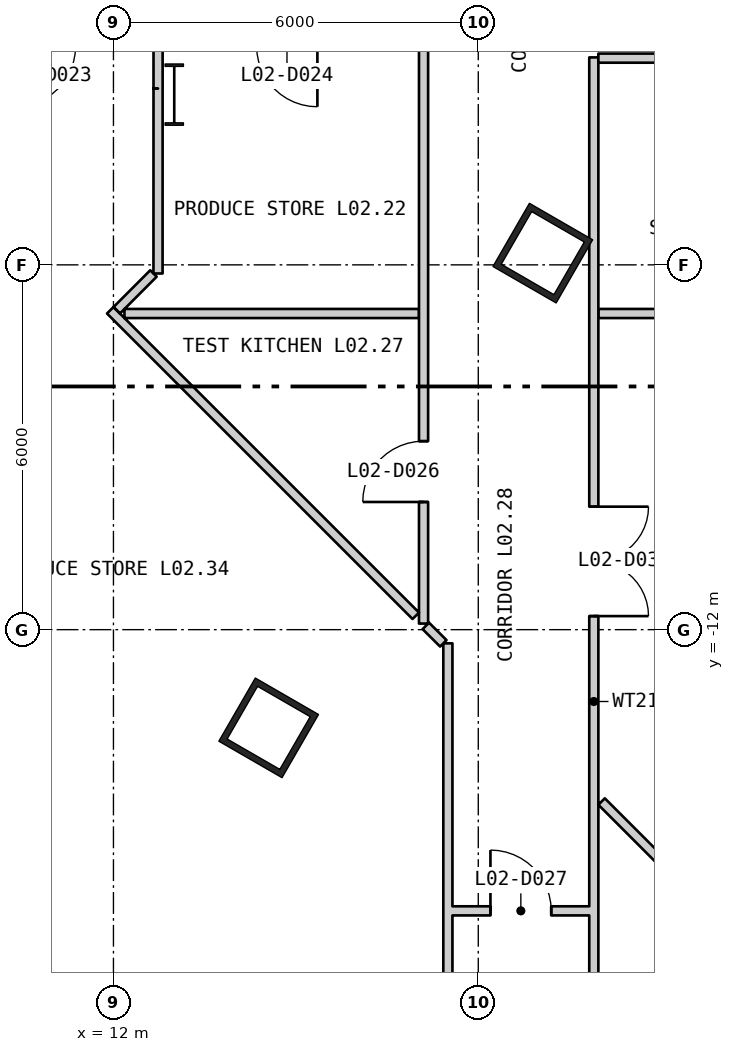
"""IFC4 building model, lengths in metres.
Left out: names, types, materials, properties, quantities, classifications, styles, units other than length and angle.
Written with IfcOpenShell. Run it as: python <this file> out.ifc"""

import sys

from ifc_helpers import new_model, si_unit, direction, frame, frame_2d, origin, origin_2d, place, context, subcontext, project, spatial, rectangle, hollow_rectangle, i_section, extrude, element, fill, save


model = new_model("IFC4")
c1 = context("Model", 3, precision=1e-05, world=origin(), true_north=direction((0.0, 1.0)))
c2 = subcontext(c1, "Body", "Model", "MODEL_VIEW")
j1 = project(units=[si_unit("LENGTHUNIT", "METRE"), si_unit("PLANEANGLEUNIT", "RADIAN")], contexts=[c1])
p1 = place(None, origin())
s1 = spatial("IfcSite", under=j1, at=p1, CompositionType="ELEMENT")
p2 = place(p1, origin())
s2 = spatial("IfcBuilding", under=s1, at=p2, CompositionType="ELEMENT")
p3 = place(p2, frame((0.0, 0.0, 13.5)))
s3 = spatial("IfcBuildingStorey", under=s2, at=p3, CompositionType="ELEMENT", Elevation=13.5)
for number, where, z_axis, x_axis in (
    (1, (14.553, -13.615, 0.0), (0.0, 0.0, 1.0), (0.5, 0.866, 0.0)),
    (2, (19.061, -5.807, 0.0), (0.0, 0.0, 1.0), (0.5, 0.866, 0.0)),
):
    element("IfcColumn", number, at=place(p3, frame(where, z_axis=z_axis, x_axis=x_axis)), inside=s3, PredefinedType="COLUMN", context=c2, shape_type="SweptSolid", body=[
        extrude(hollow_rectangle(XDim=1.2, YDim=1.2, WallThickness=0.1, at=origin_2d()), origin(), (0.0, 0.0, 1.0), 5.1),
    ])
p4 = place(p3, frame((13.0, -3.2, 0.0), z_axis=(0.0, 0.0, 1.0), x_axis=(1.0, 0.0, 0.0)))
e3 = element("IfcColumn", 3, at=p4, inside=s3, PredefinedType="COLUMN", context=c2, shape_type="SweptSolid", body=[
    extrude(i_section(OverallWidth=0.302, OverallDepth=1.008, WebThickness=0.021, FlangeThickness=0.04, at=origin_2d()), origin(), (0.0, 0.0, 1.0), 5.1),
])
p5 = place(p3, frame((11.947, -6.747, 0.0), z_axis=(0.0, 0.0, 1.0), x_axis=(0.707106781187, -0.707106781187, 0.0)))
e4 = element("IfcWall", 4, at=p5, inside=s3, PredefinedType="PARTITIONING", context=c2, shape_type="SweptSolid", body=[
    extrude(rectangle(XDim=7.106, YDim=0.15, at=frame_2d((3.553, 0.0))), origin(), (0.0, 0.0, 1.0), 4.88),
])
p6 = place(p3, frame((12.054, -6.747, 0.0), z_axis=(0.0, 0.0, 1.0), x_axis=(0.706521670373, 0.707691408238, 0.0)))
e5 = element("IfcWall", 5, at=p6, inside=s3, PredefinedType="PARTITIONING", context=c2, shape_type="SweptSolid", body=[
    extrude(rectangle(XDim=0.855, YDim=0.15, at=frame_2d((0.427, 0.0))), origin(), (0.0, 0.0, 1.0), 4.88),
])
p7 = place(p3, frame((12.181, -6.8, 0.0), z_axis=(0.0, 0.0, 1.0), x_axis=(1.0, 0.0, 0.0)))
e6 = element("IfcWall", 6, at=p7, inside=s3, PredefinedType="PARTITIONING", context=c2, shape_type="SweptSolid", body=[
    extrude(rectangle(XDim=4.844, YDim=0.15, at=frame_2d((2.422, 0.0))), origin(), (0.0, 0.0, 1.0), 4.88),
])
p8 = place(p3, frame((12.733, -6.142, 0.0), z_axis=(0.0, 0.0, 1.0), x_axis=(0.000262984869, 0.999999965419, 0.0)))
e7 = element("IfcWall", 7, at=p8, inside=s3, PredefinedType="PARTITIONING", context=c2, shape_type="SweptSolid", body=[
    extrude(rectangle(XDim=3.042, YDim=0.15, at=frame_2d((1.521, 0.0))), origin(), (0.0, 0.0, 1.0), 4.19),
])
p9 = place(p3, frame((12.734, -3.1, 0.0), z_axis=(0.0, 0.0, 1.0), x_axis=(0.000319999984, 0.9999999488, 0.0)))
e8 = element("IfcWall", 8, at=p9, inside=s3, PredefinedType="PARTITIONING", context=c2, shape_type="SweptSolid", body=[
    extrude(rectangle(XDim=0.625, YDim=0.15, at=frame_2d((0.312, 0.0))), origin(), (0.0, 0.0, 1.0), 4.28),
])
p10 = place(p3, frame((17.1, -11.9, 0.0), z_axis=(0.0, 0.0, 1.0), x_axis=(0.0, 1.0, 0.0)))
e9 = element("IfcWall", 9, at=p10, inside=s3, PredefinedType="PARTITIONING", context=c2, shape_type="SweptSolid", body=[
    extrude(rectangle(XDim=9.575, YDim=0.15, at=frame_2d((4.787, 0.0))), origin(), (0.0, 0.0, 1.0), 4.88),
])
p11 = place(p10, frame((2.0, 0.0, 0.0)))
e10 = element("IfcOpeningElement", 10, at=p11, cuts=e9, PredefinedType="OPENING", context=c2, shape_type="SweptSolid", body=[
    extrude(rectangle(XDim=1.0, YDim=2.1, at=frame_2d((0.5, 1.05))), frame((0.0, 0.085, 0.0), z_axis=(0.0, -1.0, 0.0), x_axis=(1.0, 0.0, 0.0)), (0.0, 0.0, 1.0), 0.17),
])
p12 = place(p3, frame((17.137, -11.938, 0.0), z_axis=(0.0, 0.0, 1.0), x_axis=(0.708335460904, -0.705875962776, 0.0)))
e11 = element("IfcWall", 11, at=p12, inside=s3, PredefinedType="PARTITIONING", context=c2, shape_type="SweptSolid", body=[
    extrude(rectangle(XDim=0.407, YDim=0.15, at=frame_2d((0.203, 0.0))), origin(), (0.0, 0.0, 1.0), 4.88),
])
p13 = place(p3, frame((17.5, -20.513, 0.0), z_axis=(0.0, 0.0, 1.0), x_axis=(0.0, 1.0, 0.0)))
e12 = element("IfcWall", 12, at=p13, inside=s3, PredefinedType="PARTITIONING", context=c2, shape_type="SweptSolid", body=[
    extrude(rectangle(XDim=8.288, YDim=0.15, at=frame_2d((4.144, 0.0))), origin(), (0.0, 0.0, 1.0), 4.88),
])
p14 = place(p3, frame((17.575, -16.625, 0.0), z_axis=(0.0, 0.0, 1.0), x_axis=(1.0, 0.0, 0.0)))
e13 = element("IfcWall", 13, at=p14, inside=s3, PredefinedType="PARTITIONING", context=c2, shape_type="SweptSolid", body=[
    extrude(rectangle(XDim=2.25, YDim=0.15, at=frame_2d((1.125, 0.0))), origin(), (0.0, 0.0, 1.0), 4.88),
])
p15 = place(p14, frame((0.625, 0.0, 0.0)))
e14 = element("IfcOpeningElement", 14, at=p15, cuts=e13, PredefinedType="OPENING", context=c2, shape_type="SweptSolid", body=[
    extrude(rectangle(XDim=1.0, YDim=2.1, at=frame_2d((0.5, 1.05))), frame((0.0, 0.085, 0.0), z_axis=(0.0, -1.0, 0.0), x_axis=(1.0, 0.0, 0.0)), (0.0, 0.0, 1.0), 0.17),
])
p16 = place(p3, frame((19.9, -23.775, 0.0), z_axis=(0.0, 0.0, 1.0), x_axis=(0.0, 1.0, 0.0)))
e15 = element("IfcWall", 15, at=p16, inside=s3, PredefinedType="PARTITIONING", context=c2, shape_type="SweptSolid", body=[
    extrude(rectangle(XDim=21.187, YDim=0.15, at=frame_2d((10.594, 0.0))), origin(), (0.0, 0.0, 1.0), 4.88),
])
p17 = place(p16, frame((2.643, 0.0, 0.0)))
e16 = element("IfcOpeningElement", 16, at=p17, cuts=e15, PredefinedType="OPENING", context=c2, shape_type="SweptSolid", body=[
    extrude(rectangle(XDim=1.8, YDim=2.1, at=frame_2d((0.9, 1.05))), frame((0.0, 0.085, 0.0), z_axis=(0.0, -1.0, 0.0), x_axis=(1.0, 0.0, 0.0)), (0.0, 0.0, 1.0), 0.17),
])
p18 = place(p16, frame((11.998, 0.0, 0.0)))
e17 = element("IfcOpeningElement", 17, at=p18, cuts=e15, PredefinedType="OPENING", context=c2, shape_type="SweptSolid", body=[
    extrude(rectangle(XDim=1.8, YDim=2.1, at=frame_2d((0.9, 1.05))), frame((0.0, 0.085, 0.0), z_axis=(0.0, -1.0, 0.0), x_axis=(1.0, 0.0, 0.0)), (0.0, 0.0, 1.0), 0.17),
])
p19 = place(p3, frame((19.975, -6.8, 0.0), z_axis=(0.0, 0.0, 1.0), x_axis=(1.0, 0.0, 0.0)))
e18 = element("IfcWall", 18, at=p19, inside=s3, PredefinedType="PARTITIONING", context=c2, shape_type="SweptSolid", body=[
    extrude(rectangle(XDim=6.775, YDim=0.15, at=frame_2d((3.388, 0.0))), origin(), (0.0, 0.0, 1.0), 4.09),
])
p20 = place(p3, frame((19.975, -2.6, 0.0), z_axis=(0.0, 0.0, 1.0), x_axis=(1.0, 0.0, 0.0)))
e19 = element("IfcWall", 19, at=p20, inside=s3, PredefinedType="PARTITIONING", context=c2, shape_type="SweptSolid", body=[
    extrude(rectangle(XDim=3.675, YDim=0.15, at=frame_2d((1.837, 0.0))), origin(), (0.0, 0.0, 1.0), 4.88),
])
p21 = place(p20, frame((1.312, 0.0, 0.0)))
e20 = element("IfcOpeningElement", 20, at=p21, cuts=e19, PredefinedType="OPENING", context=c2, shape_type="SweptSolid", body=[
    extrude(rectangle(XDim=1.0, YDim=2.1, at=frame_2d((0.5, 1.05))), frame((0.0, 0.085, 0.0), z_axis=(0.0, -1.0, 0.0), x_axis=(1.0, 0.0, 0.0)), (0.0, 0.0, 1.0), 0.17),
])
p22 = place(p3, frame((20.028, -14.827, 0.0), z_axis=(0.0, 0.0, 1.0), x_axis=(0.707106781187, -0.707106781187, 0.0)))
e21 = element("IfcWall", 21, at=p22, inside=s3, PredefinedType="PARTITIONING", context=c2, shape_type="SweptSolid", body=[
    extrude(rectangle(XDim=7.068, YDim=0.15, at=frame_2d((3.534, 0.0))), origin(), (0.0, 0.0, 1.0), 4.88),
])
p23 = place(p11, origin())
e22 = element("IfcDoor", 22, at=p23, inside=s3, OperationType="SINGLE_SWING_RIGHT", PredefinedType="DOOR", context=c2, shape_type="SweptSolid", body=[
    extrude(rectangle(XDim=1.0, YDim=2.1, at=frame_2d((0.5, 1.05))), frame((0.0, 0.025, 0.0), z_axis=(0.0, -1.0, 0.0), x_axis=(1.0, 0.0, 0.0)), (0.0, 0.0, 1.0), 0.05),
])
fill(e10, e22)
p24 = place(p15, origin())
e23 = element("IfcDoor", 23, at=p24, inside=s3, OperationType="SINGLE_SWING_RIGHT", PredefinedType="DOOR", context=c2, shape_type="SweptSolid", body=[
    extrude(rectangle(XDim=1.0, YDim=2.1, at=frame_2d((0.5, 1.05))), frame((0.0, 0.025, 0.0), z_axis=(0.0, -1.0, 0.0), x_axis=(1.0, 0.0, 0.0)), (0.0, 0.0, 1.0), 0.05),
])
fill(e14, e23)
p25 = place(p18, origin())
e24 = element("IfcDoor", 24, at=p25, inside=s3, OperationType="DOUBLE_DOOR_SINGLE_SWING", PredefinedType="DOOR", context=c2, shape_type="SweptSolid", body=[
    extrude(rectangle(XDim=1.8, YDim=2.1, at=frame_2d((0.9, 1.05))), frame((0.0, 0.025, 0.0), z_axis=(0.0, -1.0, 0.0), x_axis=(1.0, 0.0, 0.0)), (0.0, 0.0, 1.0), 0.05),
])
fill(e17, e24)
save(model, sys.argv[1])
